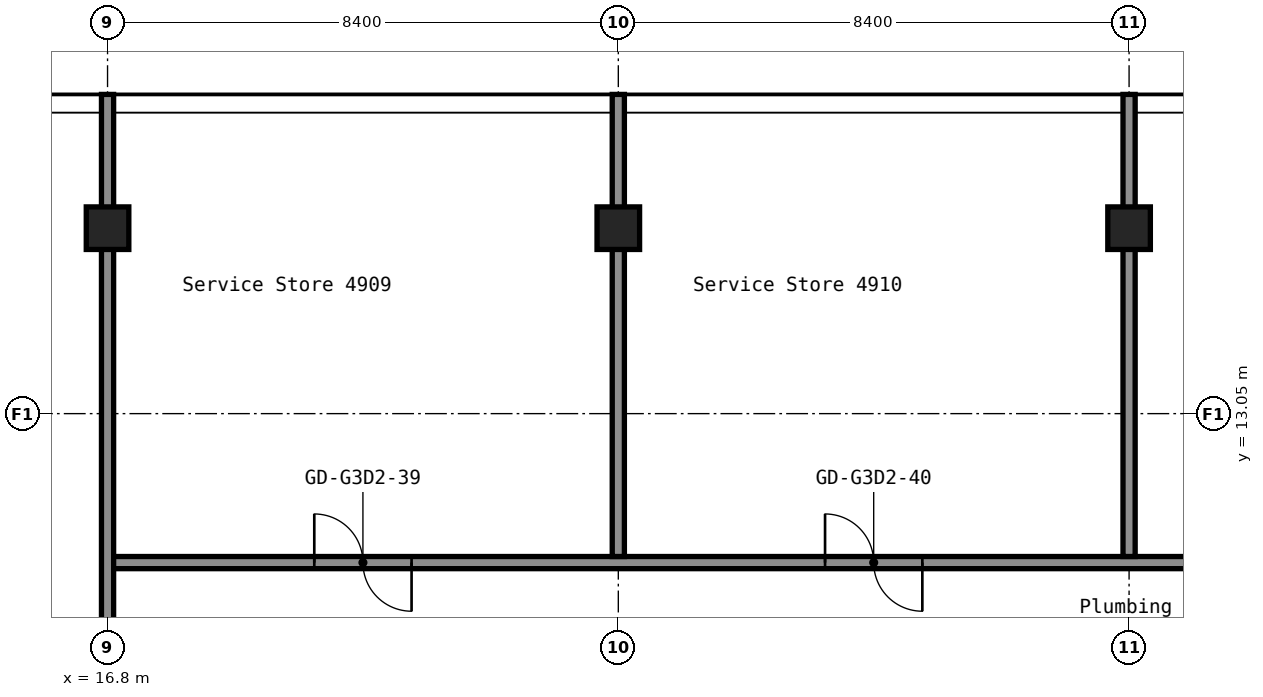
"""IFC4 building model, lengths in metres.
Left out: names, types, materials, properties, quantities, classifications, styles, units other than length and angle.
Written with IfcOpenShell. Run it as: python <this file> out.ifc"""

import sys

from ifc_helpers import new_model, si_unit, direction, frame, frame_2d, origin, origin_2d, place, context, subcontext, project, spatial, rectangle, hollow_rectangle, extrude, element, fill, save


model = new_model("IFC4")
c1 = context("Model", 3, precision=1e-05, world=origin(), true_north=direction((0.0, 1.0)))
c2 = subcontext(c1, "Body", "Model", "MODEL_VIEW")
j1 = project(units=[si_unit("LENGTHUNIT", "METRE"), si_unit("PLANEANGLEUNIT", "RADIAN")], contexts=[c1])
p1 = place(None, origin())
s1 = spatial("IfcSite", under=j1, at=p1, CompositionType="ELEMENT")
p2 = place(p1, origin())
s2 = spatial("IfcBuilding", under=s1, at=p2, CompositionType="ELEMENT")
p3 = place(p2, frame((0.0, 0.0, 172.6)))
s3 = spatial("IfcBuildingStorey", under=s2, at=p3, CompositionType="ELEMENT", Elevation=172.6)
for number, where, z_axis, x_axis in (
    (1, (16.8, 16.1, 0.0), (0.0, 0.0, 1.0), (1.0, 0.0, 0.0)),
    (2, (25.2, 16.1, 0.0), (0.0, 0.0, 1.0), (1.0, 0.0, 0.0)),
    (3, (33.6, 16.1, 0.0), (0.0, 0.0, 1.0), (1.0, 0.0, 0.0)),
):
    element("IfcColumn", number, at=place(p3, frame(where, z_axis=z_axis, x_axis=x_axis)), inside=s3, PredefinedType="COLUMN", context=c2, shape_type="SweptSolid", body=[
        extrude(hollow_rectangle(XDim=0.7, YDim=0.7, WallThickness=0.028, at=origin_2d()), origin(), (0.0, 0.0, 1.0), 2.9),
    ])
p4 = place(p3, frame((16.8, 10.6, 0.0), z_axis=(0.0, 0.0, 1.0), x_axis=(1.0, 0.0, 0.0)))
e4 = element("IfcWall", 4, at=p4, inside=s3, PredefinedType="PARTITIONING", context=c2, shape_type="SweptSolid", body=[
    extrude(rectangle(XDim=25.9, YDim=0.2, at=frame_2d((12.95, 0.0))), origin(), (0.0, 0.0, 1.0), 2.9),
])
p5 = place(p4, frame((3.4, 0.0, 0.0)))
e5 = element("IfcOpeningElement", 5, at=p5, cuts=e4, PredefinedType="OPENING", context=c2, shape_type="SweptSolid", body=[
    extrude(rectangle(XDim=1.6, YDim=2.1, at=frame_2d((0.8, 1.05))), frame((0.0, 0.11, 0.0), z_axis=(0.0, -1.0, 0.0), x_axis=(1.0, 0.0, 0.0)), (0.0, 0.0, 1.0), 0.22),
])
p6 = place(p4, frame((11.8, 0.0, 0.0)))
e6 = element("IfcOpeningElement", 6, at=p6, cuts=e4, PredefinedType="OPENING", context=c2, shape_type="SweptSolid", body=[
    extrude(rectangle(XDim=1.6, YDim=2.1, at=frame_2d((0.8, 1.05))), frame((0.0, 0.11, 0.0), z_axis=(0.0, -1.0, 0.0), x_axis=(1.0, 0.0, 0.0)), (0.0, 0.0, 1.0), 0.22),
])
p7 = place(p4, frame((20.4, 0.0, 0.0)))
e7 = element("IfcOpeningElement", 7, at=p7, cuts=e4, PredefinedType="OPENING", context=c2, shape_type="SweptSolid", body=[
    extrude(rectangle(XDim=1.6, YDim=2.1, at=frame_2d((0.8, 1.05))), frame((0.0, 0.11, 0.0), z_axis=(0.0, -1.0, 0.0), x_axis=(1.0, 0.0, 0.0)), (0.0, 0.0, 1.0), 0.22),
])
p8 = place(p3, frame((16.8, 8.39, 0.0), z_axis=(0.0, 0.0, 1.0), x_axis=(0.0, 1.0, 0.0)))
e8 = element("IfcWall", 8, at=p8, inside=s3, PredefinedType="PARTITIONING", context=c2, shape_type="SweptSolid", body=[
    extrude(rectangle(XDim=9.91, YDim=0.2, at=frame_2d((4.955, 0.0))), origin(), (0.0, 0.0, 1.0), 2.9),
])
for number, where, z_axis, x_axis in (
    (9, (25.2, 10.7, 0.0), (0.0, 0.0, 1.0), (0.0, 1.0, 0.0)),
    (10, (33.6, 10.7, 0.0), (0.0, 0.0, 1.0), (0.0, 1.0, 0.0)),
):
    element("IfcWall", number, at=place(p3, frame(where, z_axis=z_axis, x_axis=x_axis)), inside=s3, PredefinedType="PARTITIONING", context=c2, shape_type="SweptSolid", body=[
        extrude(rectangle(XDim=7.6, YDim=0.2, at=frame_2d((3.8, 0.0))), origin(), (0.0, 0.0, 1.0), 2.9),
    ])
p9 = place(p5, origin())
e11 = element("IfcDoor", 11, at=p9, inside=s3, OperationType="DOUBLE_DOOR_SINGLE_SWING", PredefinedType="DOOR", context=c2, shape_type="SweptSolid", body=[
    extrude(rectangle(XDim=1.6, YDim=2.1, at=frame_2d((0.8, 1.05))), frame((0.0, 0.025, 0.0), z_axis=(0.0, -1.0, 0.0), x_axis=(1.0, 0.0, 0.0)), (0.0, 0.0, 1.0), 0.05),
])
fill(e5, e11)
p10 = place(p6, origin())
e12 = element("IfcDoor", 12, at=p10, inside=s3, OperationType="DOUBLE_DOOR_SINGLE_SWING", PredefinedType="DOOR", context=c2, shape_type="SweptSolid", body=[
    extrude(rectangle(XDim=1.6, YDim=2.1, at=frame_2d((0.8, 1.05))), frame((0.0, 0.025, 0.0), z_axis=(0.0, -1.0, 0.0), x_axis=(1.0, 0.0, 0.0)), (0.0, 0.0, 1.0), 0.05),
])
fill(e6, e12)
save(model, sys.argv[1])
